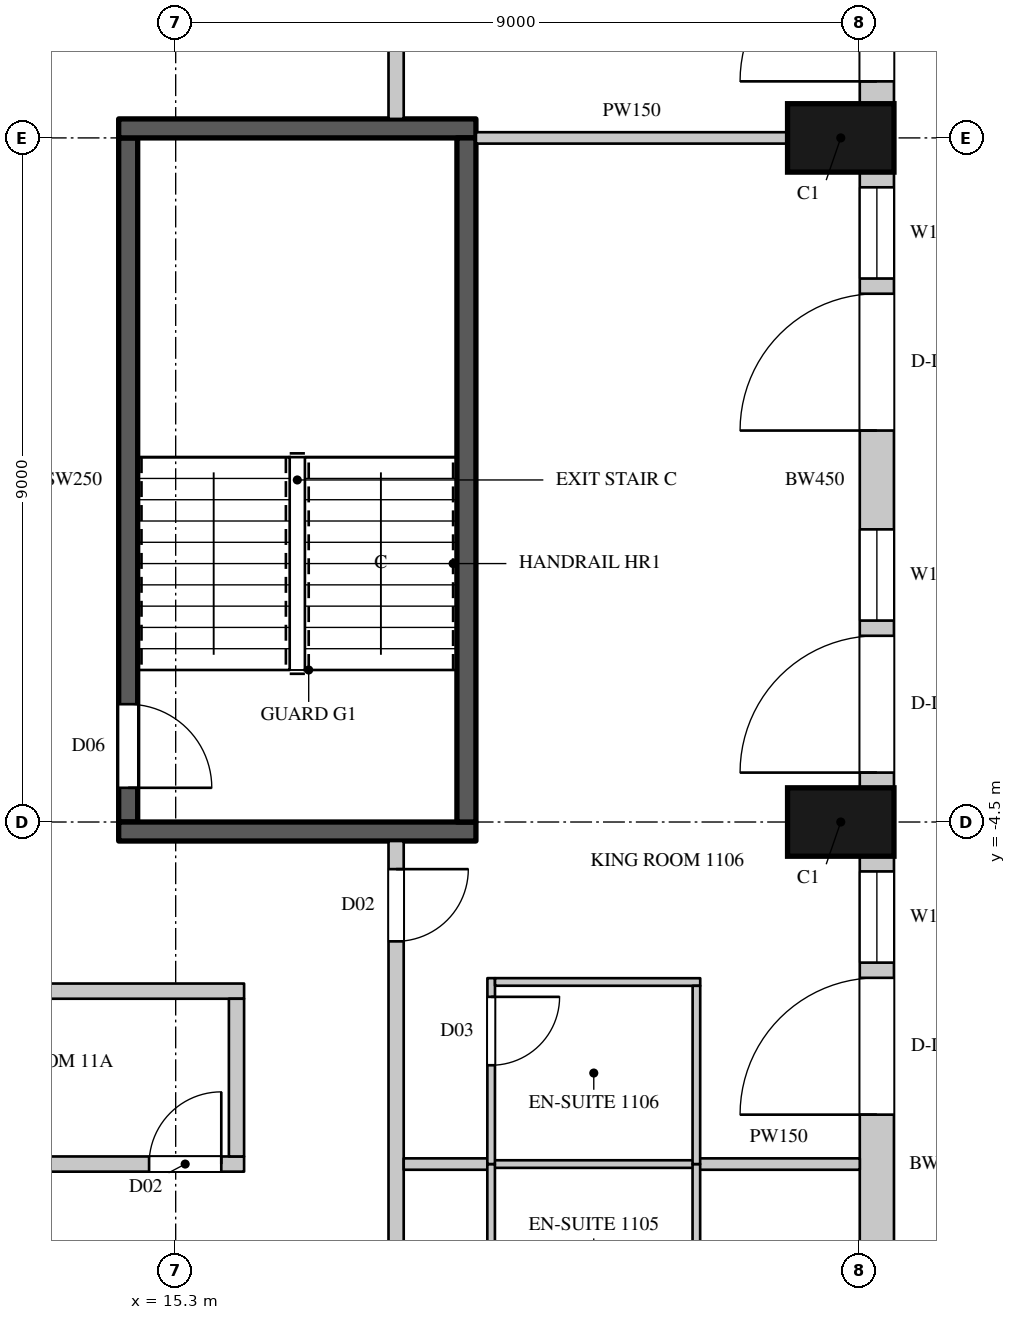
"""IFC4 building model, lengths in metres.
Left out: names, types, materials, properties, quantities, classifications, styles, units other than length and angle.
Written with IfcOpenShell. Run it as: python <this file> out.ifc"""

import sys

from ifc_helpers import new_model, si_unit, direction, frame, frame_2d, origin, origin_2d, place, context, subcontext, project, spatial, rectangle, extrude, element, fill, save


model = new_model("IFC4")
c1 = context("Model", 3, precision=1e-05, world=origin(), true_north=direction((0.0, 1.0)))
c2 = subcontext(c1, "Body", "Model", "MODEL_VIEW")
j1 = project(units=[si_unit("LENGTHUNIT", "METRE"), si_unit("PLANEANGLEUNIT", "RADIAN")], contexts=[c1])
p1 = place(None, origin())
s1 = spatial("IfcSite", under=j1, at=p1, CompositionType="ELEMENT")
p2 = place(p1, origin())
s2 = spatial("IfcBuilding", under=s1, at=p2, CompositionType="ELEMENT")
p3 = place(p2, frame((0.0, 0.0, 69.9)))
s3 = spatial("IfcBuildingStorey", under=s2, at=p3, CompositionType="ELEMENT", Elevation=69.9)
for number, where, z_axis, x_axis in (
    (1, (24.05, -4.5, 0.0), (0.0, 0.0, 1.0), (0.0, 1.0, 0.0)),
    (2, (24.05, 4.5, 0.0), (0.0, 0.0, 1.0), (0.0, 1.0, 0.0)),
):
    element("IfcColumn", number, at=place(p3, frame(where, z_axis=z_axis, x_axis=x_axis)), inside=s3, PredefinedType="COLUMN", context=c2, shape_type="SweptSolid", body=[
        extrude(rectangle(XDim=0.9, YDim=1.4, at=origin_2d()), origin(), (0.0, 0.0, 1.0), 3.6),
    ])
p4 = place(p3, frame((24.525, -13.05, 0.0), z_axis=(0.0, 0.0, 1.0), x_axis=(0.0, 1.0, 0.0)))
e3 = element("IfcWall", 3, at=p4, inside=s3, PredefinedType="SOLIDWALL", context=c2, shape_type="SweptSolid", body=[
    extrude(rectangle(XDim=8.1, YDim=0.45, at=frame_2d((4.05, 0.0))), origin(), (0.0, 0.0, 1.0), 3.3),
])
p5 = place(p4, frame((0.9, 0.0, 0.0)))
e4 = element("IfcOpeningElement", 4, at=p5, cuts=e3, PredefinedType="OPENING", context=c2, shape_type="SweptSolid", body=[
    extrude(rectangle(XDim=1.8, YDim=2.4, at=frame_2d((0.9, 1.2))), frame((0.0, 0.235, 0.0), z_axis=(0.0, -1.0, 0.0), x_axis=(1.0, 0.0, 0.0)), (0.0, 0.0, 1.0), 0.47),
])
p6 = place(p4, frame((4.7, 0.0, 0.0)))
e5 = element("IfcOpeningElement", 5, at=p6, cuts=e3, PredefinedType="OPENING", context=c2, shape_type="SweptSolid", body=[
    extrude(rectangle(XDim=1.8, YDim=2.4, at=frame_2d((0.9, 1.2))), frame((0.0, 0.235, 0.0), z_axis=(0.0, -1.0, 0.0), x_axis=(1.0, 0.0, 0.0)), (0.0, 0.0, 1.0), 0.47),
])
p7 = place(p4, frame((6.7, 0.0, 1.05)))
e6 = element("IfcOpeningElement", 6, at=p7, cuts=e3, PredefinedType="OPENING", context=c2, shape_type="SweptSolid", body=[
    extrude(rectangle(XDim=1.2, YDim=2.0, at=frame_2d((0.6, 1.0))), frame((0.0, 0.235, 0.0), z_axis=(0.0, -1.0, 0.0), x_axis=(1.0, 0.0, 0.0)), (0.0, 0.0, 1.0), 0.47),
])
p8 = place(p3, frame((24.525, -4.05, 0.0), z_axis=(0.0, 0.0, 1.0), x_axis=(0.0, 1.0, 0.0)))
e7 = element("IfcWall", 7, at=p8, inside=s3, PredefinedType="SOLIDWALL", context=c2, shape_type="SweptSolid", body=[
    extrude(rectangle(XDim=8.1, YDim=0.45, at=frame_2d((4.05, 0.0))), origin(), (0.0, 0.0, 1.0), 3.3),
])
p9 = place(p8, frame((0.2, 0.0, 0.0)))
e8 = element("IfcOpeningElement", 8, at=p9, cuts=e7, PredefinedType="OPENING", context=c2, shape_type="SweptSolid", body=[
    extrude(rectangle(XDim=1.8, YDim=2.4, at=frame_2d((0.9, 1.2))), frame((0.0, 0.235, 0.0), z_axis=(0.0, -1.0, 0.0), x_axis=(1.0, 0.0, 0.0)), (0.0, 0.0, 1.0), 0.47),
])
p10 = place(p8, frame((2.2, 0.0, 1.05)))
e9 = element("IfcOpeningElement", 9, at=p10, cuts=e7, PredefinedType="OPENING", context=c2, shape_type="SweptSolid", body=[
    extrude(rectangle(XDim=1.2, YDim=2.0, at=frame_2d((0.6, 1.0))), frame((0.0, 0.235, 0.0), z_axis=(0.0, -1.0, 0.0), x_axis=(1.0, 0.0, 0.0)), (0.0, 0.0, 1.0), 0.47),
])
p11 = place(p8, frame((4.7, 0.0, 0.0)))
e10 = element("IfcOpeningElement", 10, at=p11, cuts=e7, PredefinedType="OPENING", context=c2, shape_type="SweptSolid", body=[
    extrude(rectangle(XDim=1.8, YDim=2.4, at=frame_2d((0.9, 1.2))), frame((0.0, 0.235, 0.0), z_axis=(0.0, -1.0, 0.0), x_axis=(1.0, 0.0, 0.0)), (0.0, 0.0, 1.0), 0.47),
])
p12 = place(p8, frame((6.7, 0.0, 1.05)))
e11 = element("IfcOpeningElement", 11, at=p12, cuts=e7, PredefinedType="OPENING", context=c2, shape_type="SweptSolid", body=[
    extrude(rectangle(XDim=1.2, YDim=2.0, at=frame_2d((0.6, 1.0))), frame((0.0, 0.235, 0.0), z_axis=(0.0, -1.0, 0.0), x_axis=(1.0, 0.0, 0.0)), (0.0, 0.0, 1.0), 0.47),
])
p13 = place(p3, frame((24.525, 4.95, 0.0), z_axis=(0.0, 0.0, 1.0), x_axis=(0.0, 1.0, 0.0)))
e12 = element("IfcWall", 12, at=p13, inside=s3, PredefinedType="SOLIDWALL", context=c2, shape_type="SweptSolid", body=[
    extrude(rectangle(XDim=8.439, YDim=0.45, at=frame_2d((4.219, 0.0))), origin(), (0.0, 0.0, 1.0), 3.3),
])
p14 = place(p13, frame((0.294, 0.0, 0.0)))
e13 = element("IfcOpeningElement", 13, at=p14, cuts=e12, PredefinedType="OPENING", context=c2, shape_type="SweptSolid", body=[
    extrude(rectangle(XDim=1.8, YDim=2.4, at=frame_2d((0.9, 1.2))), frame((0.0, 0.235, 0.0), z_axis=(0.0, -1.0, 0.0), x_axis=(1.0, 0.0, 0.0)), (0.0, 0.0, 1.0), 0.47),
])
p15 = place(p13, frame((2.294, 0.0, 1.05)))
e14 = element("IfcOpeningElement", 14, at=p15, cuts=e12, PredefinedType="OPENING", context=c2, shape_type="SweptSolid", body=[
    extrude(rectangle(XDim=1.2, YDim=2.0, at=frame_2d((0.6, 1.0))), frame((0.0, 0.235, 0.0), z_axis=(0.0, -1.0, 0.0), x_axis=(1.0, 0.0, 0.0)), (0.0, 0.0, 1.0), 0.47),
])
p16 = place(p13, frame((5.232, 0.0, 1.05)))
e15 = element("IfcOpeningElement", 15, at=p16, cuts=e12, PredefinedType="OPENING", context=c2, shape_type="SweptSolid", body=[
    extrude(rectangle(XDim=2.7, YDim=2.0, at=frame_2d((1.35, 1.0))), frame((0.0, 0.235, 0.0), z_axis=(0.0, -1.0, 0.0), x_axis=(1.0, 0.0, 0.0)), (0.0, 0.0, 1.0), 0.47),
])
p17 = place(p3, frame((10.5, -9.0, 0.0), z_axis=(0.0, 0.0, 1.0), x_axis=(1.0, 0.0, 0.0)))
e16 = element("IfcWall", 16, at=p17, inside=s3, PredefinedType="PARTITIONING", context=c2, shape_type="SweptSolid", body=[
    extrude(rectangle(XDim=5.7, YDim=0.2, at=frame_2d((2.85, 0.0))), origin(), (0.0, 0.0, 1.0), 2.65),
])
p18 = place(p17, frame((4.45, 0.0, 0.0)))
e17 = element("IfcOpeningElement", 17, at=p18, cuts=e16, PredefinedType="OPENING", context=c2, shape_type="SweptSolid", body=[
    extrude(rectangle(XDim=0.95, YDim=2.2, at=frame_2d((0.475, 1.1))), frame((0.0, 0.11, 0.0), z_axis=(0.0, -1.0, 0.0), x_axis=(1.0, 0.0, 0.0)), (0.0, 0.0, 1.0), 0.22),
])
p19 = place(p3, frame((10.5, -6.725, 0.0), z_axis=(0.0, 0.0, 1.0), x_axis=(1.0, 0.0, 0.0)))
e18 = element("IfcWall", 18, at=p19, inside=s3, PredefinedType="PARTITIONING", context=c2, shape_type="SweptSolid", body=[
    extrude(rectangle(XDim=5.7, YDim=0.2, at=frame_2d((2.85, 0.0))), origin(), (0.0, 0.0, 1.0), 3.3),
])
p20 = place(p3, frame((16.1, -8.9, 0.0), z_axis=(0.0, 0.0, 1.0), x_axis=(0.0, 1.0, 0.0)))
e19 = element("IfcWall", 19, at=p20, inside=s3, PredefinedType="PARTITIONING", context=c2, shape_type="SweptSolid", body=[
    extrude(rectangle(XDim=2.075, YDim=0.2, at=frame_2d((1.038, 0.0))), origin(), (0.0, 0.0, 1.0), 3.3),
])
p21 = place(p3, frame((18.2, -19.42, 0.0), z_axis=(0.0, 0.0, 1.0), x_axis=(0.0, 1.0, 0.0)))
e20 = element("IfcWall", 20, at=p21, inside=s3, PredefinedType="PARTITIONING", context=c2, shape_type="SweptSolid", body=[
    extrude(rectangle(XDim=14.67, YDim=0.2, at=frame_2d((7.335, 0.0))), origin(), (0.0, 0.0, 1.0), 3.3),
])
p22 = place(p21, frame((3.95, 0.0, 0.0)))
e21 = element("IfcOpeningElement", 21, at=p22, cuts=e20, PredefinedType="OPENING", context=c2, shape_type="SweptSolid", body=[
    extrude(rectangle(XDim=0.95, YDim=2.2, at=frame_2d((0.475, 1.1))), frame((0.0, 0.11, 0.0), z_axis=(0.0, -1.0, 0.0), x_axis=(1.0, 0.0, 0.0)), (0.0, 0.0, 1.0), 0.22),
])
p23 = place(p21, frame((13.35, 0.0, 0.0)))
e22 = element("IfcOpeningElement", 22, at=p23, cuts=e20, PredefinedType="OPENING", context=c2, shape_type="SweptSolid", body=[
    extrude(rectangle(XDim=0.95, YDim=2.2, at=frame_2d((0.475, 1.1))), frame((0.0, 0.11, 0.0), z_axis=(0.0, -1.0, 0.0), x_axis=(1.0, 0.0, 0.0)), (0.0, 0.0, 1.0), 0.22),
])
p24 = place(p3, frame((18.2, 4.75, 0.0), z_axis=(0.0, 0.0, 1.0), x_axis=(0.0, 1.0, 0.0)))
e23 = element("IfcWall", 23, at=p24, inside=s3, PredefinedType="PARTITIONING", context=c2, shape_type="SweptSolid", body=[
    extrude(rectangle(XDim=14.134, YDim=0.2, at=frame_2d((7.067, 0.0))), origin(), (0.0, 0.0, 1.0), 3.3),
])
p25 = place(p24, frame((1.7, 0.0, 0.0)))
e24 = element("IfcOpeningElement", 24, at=p25, cuts=e23, PredefinedType="OPENING", context=c2, shape_type="SweptSolid", body=[
    extrude(rectangle(XDim=0.9, YDim=2.2, at=frame_2d((0.45, 1.1))), frame((0.0, 0.11, 0.0), z_axis=(0.0, -1.0, 0.0), x_axis=(1.0, 0.0, 0.0)), (0.0, 0.0, 1.0), 0.22),
])
p26 = place(p3, frame((18.3, -9.0, 0.0), z_axis=(0.0, 0.0, 1.0), x_axis=(1.0, 0.0, 0.0)))
e25 = element("IfcWall", 25, at=p26, inside=s3, PredefinedType="PARTITIONING", context=c2, shape_type="SweptSolid", body=[
    extrude(rectangle(XDim=1.13, YDim=0.15, at=frame_2d((0.565, 0.0))), origin(), (0.0, 0.0, 1.0), 2.65),
])
p27 = place(p3, frame((19.25, 4.5, 0.0), z_axis=(0.0, 0.0, 1.0), x_axis=(1.0, 0.0, 0.0)))
e26 = element("IfcWall", 26, at=p27, inside=s3, PredefinedType="PARTITIONING", context=c2, shape_type="SweptSolid", body=[
    extrude(rectangle(XDim=4.1, YDim=0.15, at=frame_2d((2.05, 0.0))), origin(), (0.0, 0.0, 1.0), 3.3),
])
p28 = place(p3, frame((22.17, -9.0, 0.0), z_axis=(0.0, 0.0, 1.0), x_axis=(1.0, 0.0, 0.0)))
e27 = element("IfcWall", 27, at=p28, inside=s3, PredefinedType="PARTITIONING", context=c2, shape_type="SweptSolid", body=[
    extrude(rectangle(XDim=2.13, YDim=0.15, at=frame_2d((1.065, 0.0))), origin(), (0.0, 0.0, 1.0), 2.65),
])
p29 = place(p3, frame((14.675, -4.5, 0.0), z_axis=(0.0, 0.0, 1.0), x_axis=(0.0, 1.0, 0.0)))
e28 = element("IfcWall", 28, at=p29, inside=s3, PredefinedType="SHEAR", context=c2, shape_type="SweptSolid", body=[
    extrude(rectangle(XDim=9.0, YDim=0.25, at=frame_2d((4.5, 0.0))), origin(), (0.0, 0.0, 1.0), 3.3),
])
p30 = place(p29, frame((0.45, 0.0, 0.0)))
e29 = element("IfcOpeningElement", 29, at=p30, cuts=e28, PredefinedType="OPENING", context=c2, shape_type="SweptSolid", body=[
    extrude(rectangle(XDim=1.1, YDim=2.2, at=frame_2d((0.55, 1.1))), frame((0.0, 0.135, 0.0), z_axis=(0.0, -1.0, 0.0), x_axis=(1.0, 0.0, 0.0)), (0.0, 0.0, 1.0), 0.27),
])
for number, where, z_axis, x_axis in (
    (30, (14.55, -4.625, 0.0), (0.0, 0.0, 1.0), (1.0, 0.0, 0.0)),
    (31, (14.55, 4.625, 0.0), (0.0, 0.0, 1.0), (1.0, 0.0, 0.0)),
):
    element("IfcWall", number, at=place(p3, frame(where, z_axis=z_axis, x_axis=x_axis)), inside=s3, PredefinedType="SHEAR", context=c2, shape_type="SweptSolid", body=[
        extrude(rectangle(XDim=4.7, YDim=0.25, at=frame_2d((2.35, 0.0))), origin(), (0.0, 0.0, 1.0), 3.3),
    ])
p31 = place(p3, frame((19.125, -4.5, 0.0), z_axis=(0.0, 0.0, 1.0), x_axis=(0.0, 1.0, 0.0)))
e32 = element("IfcWall", 32, at=p31, inside=s3, PredefinedType="SHEAR", context=c2, shape_type="SweptSolid", body=[
    extrude(rectangle(XDim=9.0, YDim=0.25, at=frame_2d((4.5, 0.0))), origin(), (0.0, 0.0, 1.0), 3.3),
])
p32 = place(p3, frame((19.43, -9.0, 0.0), z_axis=(0.0, 0.0, 1.0), x_axis=(1.0, 0.0, 0.0)))
e33 = element("IfcWall", 33, at=p32, inside=s3, PredefinedType="PARTITIONING", context=c2, shape_type="SweptSolid", body=[
    extrude(rectangle(XDim=2.74, YDim=0.1, at=frame_2d((1.37, 0.0))), origin(), (0.0, 0.0, 1.0), 2.65),
])
p33 = place(p3, frame((19.45, -11.346, 0.0), z_axis=(0.0, 0.0, 1.0), x_axis=(0.0, 1.0, 0.0)))
e34 = element("IfcWall", 34, at=p33, inside=s3, PredefinedType="PARTITIONING", context=c2, shape_type="SweptSolid", body=[
    extrude(rectangle(XDim=2.346, YDim=0.1, at=frame_2d((1.173, 0.0))), origin(), (0.0, 0.0, 1.0), 3.3),
])
p34 = place(p33, frame((0.15, 0.0, 0.0)))
e35 = element("IfcOpeningElement", 35, at=p34, cuts=e34, PredefinedType="OPENING", context=c2, shape_type="SweptSolid", body=[
    extrude(rectangle(XDim=0.9, YDim=2.2, at=frame_2d((0.45, 1.1))), frame((0.0, 0.06, 0.0), z_axis=(0.0, -1.0, 0.0), x_axis=(1.0, 0.0, 0.0)), (0.0, 0.0, 1.0), 0.12),
])
p35 = place(p3, frame((19.45, -9.0, 0.0), z_axis=(0.0, 0.0, 1.0), x_axis=(0.000399241409, 0.999999920303, 0.0)))
e36 = element("IfcWall", 36, at=p35, inside=s3, PredefinedType="PARTITIONING", context=c2, shape_type="SweptSolid", body=[
    extrude(rectangle(XDim=2.446, YDim=0.1, at=frame_2d((1.223, 0.0))), origin(), (0.0, 0.0, 1.0), 3.3),
])
p36 = place(p35, frame((1.3, 0.0, 0.0)))
e37 = element("IfcOpeningElement", 37, at=p36, cuts=e36, PredefinedType="OPENING", context=c2, shape_type="SweptSolid", body=[
    extrude(rectangle(XDim=0.9, YDim=2.2, at=frame_2d((0.45, 1.1))), frame((0.0, 0.06, 0.0), z_axis=(0.0, -1.0, 0.0), x_axis=(1.0, 0.0, 0.0)), (0.0, 0.0, 1.0), 0.12),
])
p37 = place(p3, frame((19.501, -6.604, 0.0), z_axis=(0.0, 0.0, 1.0), x_axis=(0.999999934588, -0.000361696332, 0.0)))
e38 = element("IfcWall", 38, at=p37, inside=s3, PredefinedType="PARTITIONING", context=c2, shape_type="SweptSolid", body=[
    extrude(rectangle(XDim=2.7, YDim=0.1, at=frame_2d((1.35, 0.0))), origin(), (0.0, 0.0, 1.0), 3.3),
])
p38 = place(p3, frame((22.15, -11.346, 0.0), z_axis=(0.0, 0.0, 1.0), x_axis=(0.0, 1.0, 0.0)))
e39 = element("IfcWall", 39, at=p38, inside=s3, PredefinedType="PARTITIONING", context=c2, shape_type="SweptSolid", body=[
    extrude(rectangle(XDim=2.346, YDim=0.1, at=frame_2d((1.173, 0.0))), origin(), (0.0, 0.0, 1.0), 3.3),
])
p39 = place(p3, frame((22.15, -9.0, 0.0), z_axis=(0.0, 0.0, 1.0), x_axis=(0.00041644973, 0.999999913285, 0.0)))
e40 = element("IfcWall", 40, at=p39, inside=s3, PredefinedType="PARTITIONING", context=c2, shape_type="SweptSolid", body=[
    extrude(rectangle(XDim=2.345, YDim=0.1, at=frame_2d((1.172, 0.0))), origin(), (0.0, 0.0, 1.0), 3.3),
])
p40 = place(p6, origin())
e41 = element("IfcDoor", 41, at=p40, inside=s3, OperationType="SLIDING_TO_LEFT", PredefinedType="DOOR", context=c2, shape_type="SweptSolid", body=[
    extrude(rectangle(XDim=1.8, YDim=2.4, at=frame_2d((0.9, 1.2))), frame((0.0, 0.13, 0.0), z_axis=(0.0, -1.0, 0.0), x_axis=(1.0, 0.0, 0.0)), (0.0, 0.0, 1.0), 0.05),
])
fill(e5, e41)
p41 = place(p7, origin())
e42 = element("IfcWindow", 42, at=p41, inside=s3, PartitioningType="SINGLE_PANEL", PredefinedType="WINDOW", context=c2, shape_type="SweptSolid", body=[
    extrude(rectangle(XDim=1.2, YDim=2.0, at=frame_2d((0.6, 1.0))), frame((0.0, 0.135, 0.0), z_axis=(0.0, -1.0, 0.0), x_axis=(1.0, 0.0, 0.0)), (0.0, 0.0, 1.0), 0.06),
])
fill(e6, e42)
p42 = place(p9, origin())
e43 = element("IfcDoor", 43, at=p42, inside=s3, OperationType="SLIDING_TO_LEFT", PredefinedType="DOOR", context=c2, shape_type="SweptSolid", body=[
    extrude(rectangle(XDim=1.8, YDim=2.4, at=frame_2d((0.9, 1.2))), frame((0.0, 0.13, 0.0), z_axis=(0.0, -1.0, 0.0), x_axis=(1.0, 0.0, 0.0)), (0.0, 0.0, 1.0), 0.05),
])
fill(e8, e43)
p43 = place(p10, origin())
e44 = element("IfcWindow", 44, at=p43, inside=s3, PartitioningType="SINGLE_PANEL", PredefinedType="WINDOW", context=c2, shape_type="SweptSolid", body=[
    extrude(rectangle(XDim=1.2, YDim=2.0, at=frame_2d((0.6, 1.0))), frame((0.0, 0.135, 0.0), z_axis=(0.0, -1.0, 0.0), x_axis=(1.0, 0.0, 0.0)), (0.0, 0.0, 1.0), 0.06),
])
fill(e9, e44)
p44 = place(p11, origin())
e45 = element("IfcDoor", 45, at=p44, inside=s3, OperationType="SLIDING_TO_LEFT", PredefinedType="DOOR", context=c2, shape_type="SweptSolid", body=[
    extrude(rectangle(XDim=1.8, YDim=2.4, at=frame_2d((0.9, 1.2))), frame((0.0, 0.13, 0.0), z_axis=(0.0, -1.0, 0.0), x_axis=(1.0, 0.0, 0.0)), (0.0, 0.0, 1.0), 0.05),
])
fill(e10, e45)
p45 = place(p12, origin())
e46 = element("IfcWindow", 46, at=p45, inside=s3, PartitioningType="SINGLE_PANEL", PredefinedType="WINDOW", context=c2, shape_type="SweptSolid", body=[
    extrude(rectangle(XDim=1.2, YDim=2.0, at=frame_2d((0.6, 1.0))), frame((0.0, 0.135, 0.0), z_axis=(0.0, -1.0, 0.0), x_axis=(1.0, 0.0, 0.0)), (0.0, 0.0, 1.0), 0.06),
])
fill(e11, e46)
p46 = place(p14, origin())
e47 = element("IfcDoor", 47, at=p46, inside=s3, OperationType="SLIDING_TO_LEFT", PredefinedType="DOOR", context=c2, shape_type="SweptSolid", body=[
    extrude(rectangle(XDim=1.8, YDim=2.4, at=frame_2d((0.9, 1.2))), frame((0.0, 0.13, 0.0), z_axis=(0.0, -1.0, 0.0), x_axis=(1.0, 0.0, 0.0)), (0.0, 0.0, 1.0), 0.05),
])
fill(e13, e47)
p47 = place(p18, origin())
e48 = element("IfcDoor", 48, at=p47, inside=s3, OperationType="SINGLE_SWING_RIGHT", PredefinedType="DOOR", context=c2, shape_type="SweptSolid", body=[
    extrude(rectangle(XDim=0.95, YDim=2.2, at=frame_2d((0.475, 1.1))), frame((0.0, 0.025, 0.0), z_axis=(0.0, -1.0, 0.0), x_axis=(1.0, 0.0, 0.0)), (0.0, 0.0, 1.0), 0.05),
])
fill(e17, e48)
p48 = place(p23, origin())
e49 = element("IfcDoor", 49, at=p48, inside=s3, OperationType="SINGLE_SWING_LEFT", PredefinedType="DOOR", context=c2, shape_type="SweptSolid", body=[
    extrude(rectangle(XDim=0.95, YDim=2.2, at=frame_2d((0.475, 1.1))), frame((0.0, 0.025, 0.0), z_axis=(0.0, -1.0, 0.0), x_axis=(1.0, 0.0, 0.0)), (0.0, 0.0, 1.0), 0.05),
])
fill(e22, e49)
p49 = place(p36, origin())
e50 = element("IfcDoor", 50, at=p49, inside=s3, OperationType="SINGLE_SWING_LEFT", PredefinedType="DOOR", context=c2, shape_type="SweptSolid", body=[
    extrude(rectangle(XDim=0.9, YDim=2.2, at=frame_2d((0.45, 1.1))), frame((0.0, 0.025, 0.0), z_axis=(0.0, -1.0, 0.0), x_axis=(1.0, 0.0, 0.0)), (0.0, 0.0, 1.0), 0.05),
])
fill(e37, e50)
p50 = place(p30, origin())
e51 = element("IfcDoor", 51, at=p50, inside=s3, OperationType="SINGLE_SWING_RIGHT", PredefinedType="DOOR", context=c2, shape_type="SweptSolid", body=[
    extrude(rectangle(XDim=1.1, YDim=2.2, at=frame_2d((0.55, 1.1))), frame((0.0, 0.025, 0.0), z_axis=(0.0, -1.0, 0.0), x_axis=(1.0, 0.0, 0.0)), (0.0, 0.0, 1.0), 0.05),
])
fill(e29, e51)
save(model, sys.argv[1])
